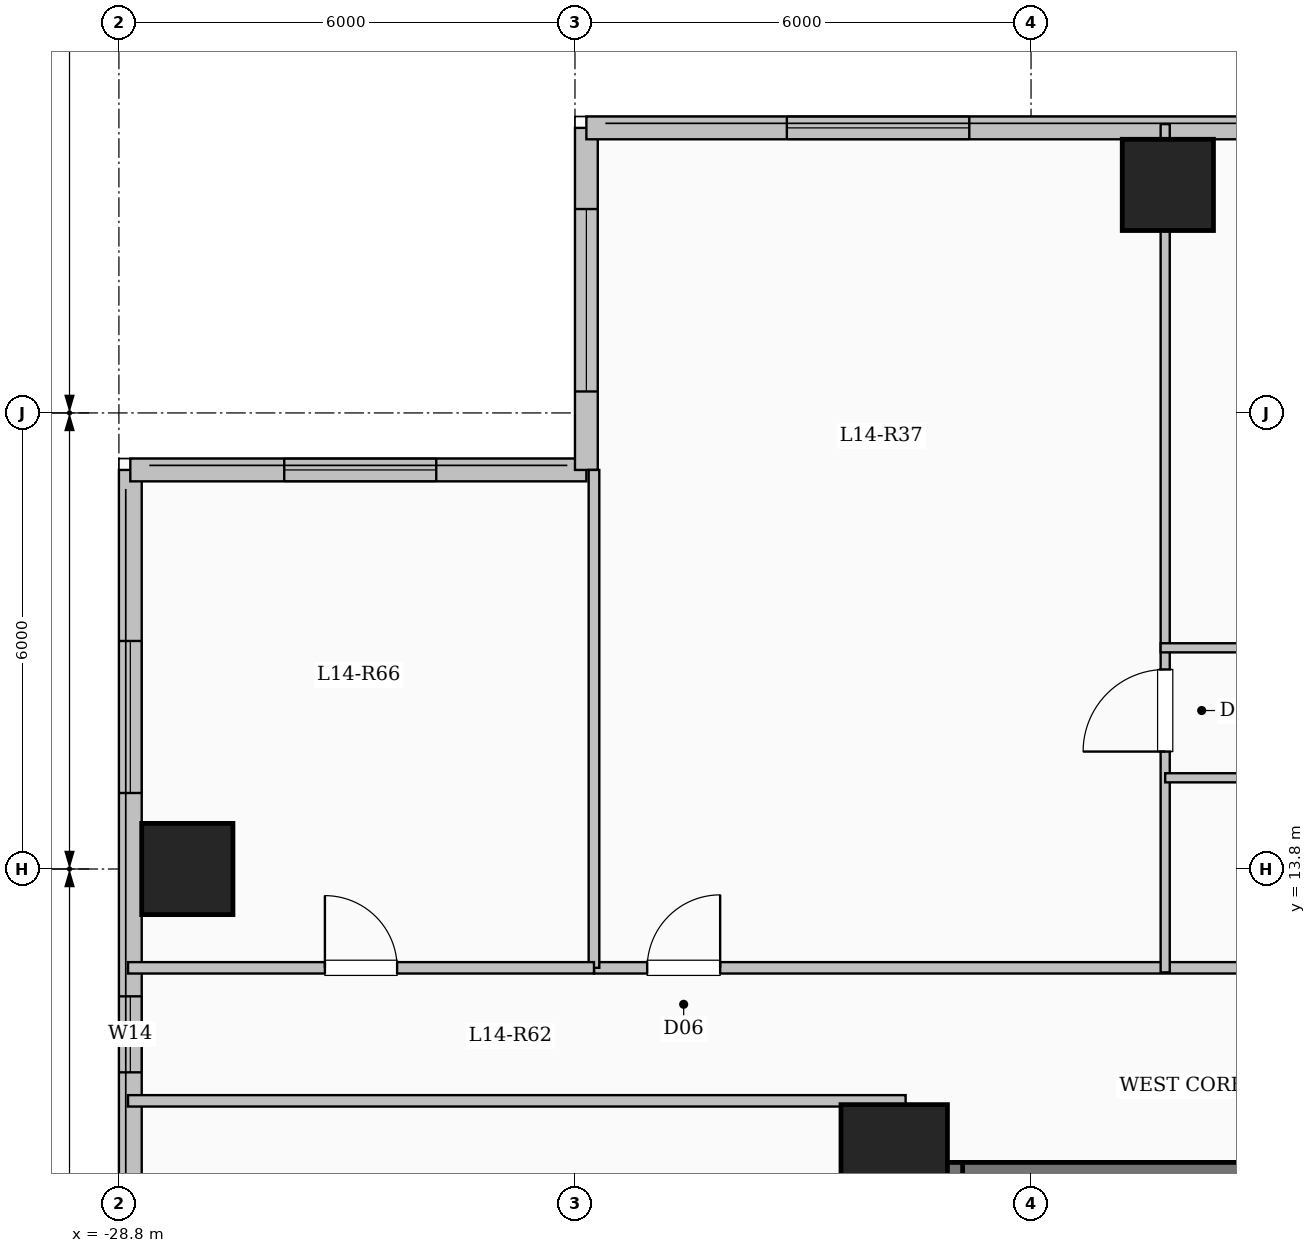
"""IFC4 building model, lengths in metres.
Left out: names, types, materials, properties, quantities, classifications, styles, units other than length and angle.
Written with IfcOpenShell. Run it as: python <this file> out.ifc"""

import sys

from ifc_helpers import new_model, si_unit, direction, frame, frame_2d, origin, origin_2d, place, context, subcontext, project, spatial, rectangle, extrude, element, fill, save


model = new_model("IFC4")
c1 = context("Model", 3, precision=1e-05, world=origin(), true_north=direction((0.0, 1.0)))
c2 = subcontext(c1, "Body", "Model", "MODEL_VIEW")
j1 = project(units=[si_unit("LENGTHUNIT", "METRE"), si_unit("PLANEANGLEUNIT", "RADIAN")], contexts=[c1])
p1 = place(None, origin())
s1 = spatial("IfcSite", under=j1, at=p1, CompositionType="ELEMENT")
p2 = place(p1, origin())
s2 = spatial("IfcBuilding", under=s1, at=p2, CompositionType="ELEMENT")
p3 = place(p2, frame((0.0, 0.0, 54.15)))
s3 = spatial("IfcBuildingStorey", under=s2, at=p3, CompositionType="ELEMENT", Elevation=54.15)
p4 = place(p3, frame((-18.6, 10.0, 0.0), z_axis=(0.0, 0.0, 1.0), x_axis=(1.0, 0.0, 0.0)))
e1 = element("IfcColumn", 1, at=p4, inside=s3, PredefinedType="COLUMN", context=c2, shape_type="SweptSolid", body=[
    extrude(rectangle(XDim=1.4, YDim=1.4, at=origin_2d()), origin(), (0.0, 0.0, 1.0), 3.35),
])
for number, where, z_axis, x_axis in (
    (2, (-15.0, 22.8, 0.0), (0.0, 0.0, 1.0), (1.0, 0.0, 0.0)),
    (3, (-27.9, 13.8, 0.0), (0.0, 0.0, 1.0), (1.0, 0.0, 0.0)),
):
    element("IfcColumn", number, at=place(p3, frame(where, z_axis=z_axis, x_axis=x_axis)), inside=s3, PredefinedType="COLUMN", context=c2, shape_type="SweptSolid", body=[
        extrude(rectangle(XDim=1.2, YDim=1.2, at=origin_2d()), origin(), (0.0, 0.0, 1.0), 3.35),
    ])
p5 = place(p3, frame((-28.65, -19.05, 0.0), z_axis=(0.0, 0.0, 1.0), x_axis=(0.0, 1.0, 0.0)))
e4 = element("IfcWall", 4, at=p5, inside=s3, PredefinedType="SOLIDWALL", context=c2, shape_type="SweptSolid", body=[
    extrude(rectangle(XDim=38.1, YDim=0.3, at=frame_2d((19.05, 0.0))), origin(), (0.0, 0.0, 1.0), 3.1),
])
p6 = place(p5, frame((3.15, 0.0, 0.9)))
e5 = element("IfcOpeningElement", 5, at=p6, cuts=e4, PredefinedType="OPENING", context=c2, shape_type="SweptSolid", body=[
    extrude(rectangle(XDim=2.4, YDim=1.8, at=frame_2d((1.2, 0.9))), frame((0.0, 0.16, 0.0), z_axis=(0.0, -1.0, 0.0), x_axis=(1.0, 0.0, 0.0)), (0.0, 0.0, 1.0), 0.32),
])
p7 = place(p5, frame((9.542, 0.0, 0.9)))
e6 = element("IfcOpeningElement", 6, at=p7, cuts=e4, PredefinedType="OPENING", context=c2, shape_type="SweptSolid", body=[
    extrude(rectangle(XDim=1.5, YDim=1.65, at=frame_2d((0.75, 0.825))), frame((0.0, 0.16, 0.0), z_axis=(0.0, -1.0, 0.0), x_axis=(1.0, 0.0, 0.0)), (0.0, 0.0, 1.0), 0.32),
])
p8 = place(p5, frame((19.8, 0.0, 0.9)))
e7 = element("IfcOpeningElement", 7, at=p8, cuts=e4, PredefinedType="OPENING", context=c2, shape_type="SweptSolid", body=[
    extrude(rectangle(XDim=2.0, YDim=1.7, at=frame_2d((1.0, 0.85))), frame((0.0, 0.16, 0.0), z_axis=(0.0, -1.0, 0.0), x_axis=(1.0, 0.0, 0.0)), (0.0, 0.0, 1.0), 0.32),
])
p9 = place(p5, frame((30.175, 0.0, 0.95)))
e8 = element("IfcOpeningElement", 8, at=p9, cuts=e4, PredefinedType="OPENING", context=c2, shape_type="SweptSolid", body=[
    extrude(rectangle(XDim=1.0, YDim=1.5, at=frame_2d((0.5, 0.75))), frame((0.0, 0.16, 0.0), z_axis=(0.0, -1.0, 0.0), x_axis=(1.0, 0.0, 0.0)), (0.0, 0.0, 1.0), 0.32),
])
p10 = place(p5, frame((33.85, 0.0, 0.9)))
e9 = element("IfcOpeningElement", 9, at=p10, cuts=e4, PredefinedType="OPENING", context=c2, shape_type="SweptSolid", body=[
    extrude(rectangle(XDim=2.0, YDim=1.7, at=frame_2d((1.0, 0.85))), frame((0.0, 0.16, 0.0), z_axis=(0.0, -1.0, 0.0), x_axis=(1.0, 0.0, 0.0)), (0.0, 0.0, 1.0), 0.32),
])
p11 = place(p3, frame((-28.65, 19.05, 0.0), z_axis=(0.0, 0.0, 1.0), x_axis=(1.0, 0.0, 0.0)))
e10 = element("IfcWall", 10, at=p11, inside=s3, PredefinedType="SOLIDWALL", context=c2, shape_type="SweptSolid", body=[
    extrude(rectangle(XDim=6.0, YDim=0.3, at=frame_2d((3.0, 0.0))), origin(), (0.0, 0.0, 1.0), 3.1),
])
p12 = place(p11, frame((2.025, 0.0, 0.9)))
e11 = element("IfcOpeningElement", 11, at=p12, cuts=e10, PredefinedType="OPENING", context=c2, shape_type="SweptSolid", body=[
    extrude(rectangle(XDim=2.0, YDim=1.7, at=frame_2d((1.0, 0.85))), frame((0.0, 0.16, 0.0), z_axis=(0.0, -1.0, 0.0), x_axis=(1.0, 0.0, 0.0)), (0.0, 0.0, 1.0), 0.32),
])
p13 = place(p3, frame((-22.65, 19.05, 0.0), z_axis=(0.0, 0.0, 1.0), x_axis=(0.0, 1.0, 0.0)))
e12 = element("IfcWall", 12, at=p13, inside=s3, PredefinedType="SOLIDWALL", context=c2, shape_type="SweptSolid", body=[
    extrude(rectangle(XDim=4.5, YDim=0.3, at=frame_2d((2.25, 0.0))), origin(), (0.0, 0.0, 1.0), 3.1),
])
p14 = place(p13, frame((1.032, 0.0, 0.9)))
e13 = element("IfcOpeningElement", 13, at=p14, cuts=e12, PredefinedType="OPENING", context=c2, shape_type="SweptSolid", body=[
    extrude(rectangle(XDim=2.4, YDim=1.8, at=frame_2d((1.2, 0.9))), frame((0.0, 0.16, 0.0), z_axis=(0.0, -1.0, 0.0), x_axis=(1.0, 0.0, 0.0)), (0.0, 0.0, 1.0), 0.32),
])
p15 = place(p3, frame((-22.65, 23.55, 0.0), z_axis=(0.0, 0.0, 1.0), x_axis=(1.0, 0.0, 0.0)))
e14 = element("IfcWall", 14, at=p15, inside=s3, PredefinedType="SOLIDWALL", context=c2, shape_type="SweptSolid", body=[
    extrude(rectangle(XDim=15.3, YDim=0.3, at=frame_2d((7.65, 0.0))), origin(), (0.0, 0.0, 1.0), 3.1),
])
p16 = place(p15, frame((2.637, 0.0, 0.9)))
e15 = element("IfcOpeningElement", 15, at=p16, cuts=e14, PredefinedType="OPENING", context=c2, shape_type="SweptSolid", body=[
    extrude(rectangle(XDim=2.4, YDim=1.8, at=frame_2d((1.2, 0.9))), frame((0.0, 0.16, 0.0), z_axis=(0.0, -1.0, 0.0), x_axis=(1.0, 0.0, 0.0)), (0.0, 0.0, 1.0), 0.32),
])
p17 = place(p15, frame((8.656, 0.0, 0.9)))
e16 = element("IfcOpeningElement", 16, at=p17, cuts=e14, PredefinedType="OPENING", context=c2, shape_type="SweptSolid", body=[
    extrude(rectangle(XDim=1.8, YDim=1.65, at=frame_2d((0.9, 0.825))), frame((0.0, 0.16, 0.0), z_axis=(0.0, -1.0, 0.0), x_axis=(1.0, 0.0, 0.0)), (0.0, 0.0, 1.0), 0.32),
])
p18 = place(p15, frame((12.544, 0.0, 0.9)))
e17 = element("IfcOpeningElement", 17, at=p18, cuts=e14, PredefinedType="OPENING", context=c2, shape_type="SweptSolid", body=[
    extrude(rectangle(XDim=1.8, YDim=1.65, at=frame_2d((0.9, 0.825))), frame((0.0, 0.16, 0.0), z_axis=(0.0, -1.0, 0.0), x_axis=(1.0, 0.0, 0.0)), (0.0, 0.0, 1.0), 0.32),
])
p19 = place(p3, frame((-18.0, 9.79, 0.0), z_axis=(0.0, 0.0, 1.0), x_axis=(1.0, 0.0, 0.0)))
e18 = element("IfcWall", 18, at=p19, inside=s3, PredefinedType="SHEAR", context=c2, shape_type="SweptSolid", body=[
    extrude(rectangle(XDim=8.0, YDim=0.3, at=frame_2d((4.0, 0.0))), origin(), (0.0, 0.0, 1.0), 3.35),
])
p20 = place(p3, frame((-17.85, 6.35, 0.0), z_axis=(0.0, 0.0, 1.0), x_axis=(0.0, 1.0, 0.0)))
e19 = element("IfcWall", 19, at=p20, inside=s3, PredefinedType="SHEAR", context=c2, shape_type="SweptSolid", body=[
    extrude(rectangle(XDim=3.59, YDim=0.3, at=frame_2d((1.795, 0.0))), origin(), (0.0, 0.0, 1.0), 3.35),
])
p21 = place(p3, frame((-22.55, 12.5, 0.0), z_axis=(0.0, 0.0, 1.0), x_axis=(1.0, 0.0, 0.0)))
e20 = element("IfcWall", 20, at=p21, inside=s3, PredefinedType="PARTITIONING", context=c2, shape_type="SweptSolid", body=[
    extrude(rectangle(XDim=18.7, YDim=0.15, at=frame_2d((9.35, 0.0))), origin(), (0.0, 0.0, 1.0), 3.1),
])
p22 = place(p21, frame((0.7, 0.0, 0.0)))
e21 = element("IfcOpeningElement", 21, at=p22, cuts=e20, PredefinedType="OPENING", context=c2, shape_type="SweptSolid", body=[
    extrude(rectangle(XDim=0.96, YDim=2.15, at=frame_2d((0.48, 1.075))), frame((0.0, 0.085, 0.0), z_axis=(0.0, -1.0, 0.0), x_axis=(1.0, 0.0, 0.0)), (0.0, 0.0, 1.0), 0.17),
])
p23 = place(p3, frame((-15.035, 12.44, 0.0), z_axis=(0.0, 0.0, 1.0), x_axis=(0.0, 1.0, 0.0)))
e22 = element("IfcWall", 22, at=p23, inside=s3, PredefinedType="PARTITIONING", context=c2, shape_type="SweptSolid", body=[
    extrude(rectangle(XDim=11.16, YDim=0.12, at=frame_2d((5.58, 0.0))), origin(), (0.0, 0.0, 1.0), 2.435),
])
p24 = place(p23, frame((2.905, 0.0, 0.0)))
e23 = element("IfcOpeningElement", 23, at=p24, cuts=e22, PredefinedType="OPENING", context=c2, shape_type="SweptSolid", body=[
    extrude(rectangle(XDim=1.08, YDim=2.15, at=frame_2d((0.54, 1.075))), frame((0.0, 0.07, 0.0), z_axis=(0.0, -1.0, 0.0), x_axis=(1.0, 0.0, 0.0)), (0.0, 0.0, 1.0), 0.14),
])
p25 = place(p3, frame((-15.035, 15.0, 0.0), z_axis=(0.0, 0.0, 1.0), x_axis=(1.0, 0.0, 0.0)))
e24 = element("IfcWall", 24, at=p25, inside=s3, PredefinedType="PARTITIONING", context=c2, shape_type="SweptSolid", body=[
    extrude(rectangle(XDim=8.228, YDim=0.12, at=frame_2d((4.114, 0.0))), origin(), (0.0, 0.0, 1.0), 2.585),
])
p26 = place(p25, frame((3.674, 0.0, 0.0)))
e25 = element("IfcOpeningElement", 25, at=p26, cuts=e24, PredefinedType="OPENING", context=c2, shape_type="SweptSolid", body=[
    extrude(rectangle(XDim=0.88, YDim=2.1, at=frame_2d((0.44, 1.05))), frame((0.0, 0.07, 0.0), z_axis=(0.0, -1.0, 0.0), x_axis=(1.0, 0.0, 0.0)), (0.0, 0.0, 1.0), 0.14),
])
p27 = place(p3, frame((-15.095, 16.71, 0.0), z_axis=(0.0, 0.0, 1.0), x_axis=(1.0, 0.0, 0.0)))
e26 = element("IfcWall", 26, at=p27, inside=s3, PredefinedType="PARTITIONING", context=c2, shape_type="SweptSolid", body=[
    extrude(rectangle(XDim=15.705, YDim=0.12, at=frame_2d((7.853, 0.0))), origin(), (0.0, 0.0, 1.0), 2.585),
])
p28 = place(p27, frame((1.501, 0.0, 0.0)))
e27 = element("IfcOpeningElement", 27, at=p28, cuts=e26, PredefinedType="OPENING", context=c2, shape_type="SweptSolid", body=[
    extrude(rectangle(XDim=0.88, YDim=2.1, at=frame_2d((0.44, 1.05))), frame((0.0, 0.07, 0.0), z_axis=(0.0, -1.0, 0.0), x_axis=(1.0, 0.0, 0.0)), (0.0, 0.0, 1.0), 0.14),
])
p29 = place(p27, frame((5.382, 0.0, 0.0)))
e28 = element("IfcOpeningElement", 28, at=p29, cuts=e26, PredefinedType="OPENING", context=c2, shape_type="SweptSolid", body=[
    extrude(rectangle(XDim=0.88, YDim=2.1, at=frame_2d((0.44, 1.05))), frame((0.0, 0.07, 0.0), z_axis=(0.0, -1.0, 0.0), x_axis=(1.0, 0.0, 0.0)), (0.0, 0.0, 1.0), 0.14),
])
p30 = place(p27, frame((9.263, 0.0, 0.0)))
e29 = element("IfcOpeningElement", 29, at=p30, cuts=e26, PredefinedType="OPENING", context=c2, shape_type="SweptSolid", body=[
    extrude(rectangle(XDim=0.88, YDim=2.1, at=frame_2d((0.44, 1.05))), frame((0.0, 0.07, 0.0), z_axis=(0.0, -1.0, 0.0), x_axis=(1.0, 0.0, 0.0)), (0.0, 0.0, 1.0), 0.14),
])
p31 = place(p27, frame((13.144, 0.0, 0.0)))
e30 = element("IfcOpeningElement", 30, at=p31, cuts=e26, PredefinedType="OPENING", context=c2, shape_type="SweptSolid", body=[
    extrude(rectangle(XDim=0.88, YDim=2.1, at=frame_2d((0.44, 1.05))), frame((0.0, 0.07, 0.0), z_axis=(0.0, -1.0, 0.0), x_axis=(1.0, 0.0, 0.0)), (0.0, 0.0, 1.0), 0.14),
])
p32 = place(p3, frame((-28.68, 10.75, 0.0), z_axis=(0.0, 0.0, 1.0), x_axis=(1.0, 0.0, 0.0)))
e31 = element("IfcWall", 31, at=p32, inside=s3, PredefinedType="PARTITIONING", context=c2, shape_type="SweptSolid", body=[
    extrude(rectangle(XDim=10.23, YDim=0.15, at=frame_2d((5.115, 0.0))), origin(), (0.0, 0.0, 1.0), 3.1),
])
p33 = place(p3, frame((-22.55, 12.5, 0.0), z_axis=(0.0, 0.0, 1.0), x_axis=(0.0, 1.0, 0.0)))
e32 = element("IfcWall", 32, at=p33, inside=s3, PredefinedType="PARTITIONING", context=c2, shape_type="SweptSolid", body=[
    extrude(rectangle(XDim=6.55, YDim=0.14, at=frame_2d((3.275, 0.0))), origin(), (0.0, 0.0, 1.0), 3.1),
])
p34 = place(p3, frame((-28.68, 12.5, 0.0), z_axis=(0.0, 0.0, 1.0), x_axis=(1.0, 0.0, 0.0)))
e33 = element("IfcWall", 33, at=p34, inside=s3, PredefinedType="PARTITIONING", context=c2, shape_type="SweptSolid", body=[
    extrude(rectangle(XDim=6.13, YDim=0.15, at=frame_2d((3.065, 0.0))), origin(), (0.0, 0.0, 1.0), 3.1),
])
p35 = place(p34, frame((2.59, 0.0, 0.0)))
e34 = element("IfcOpeningElement", 34, at=p35, cuts=e33, PredefinedType="OPENING", context=c2, shape_type="SweptSolid", body=[
    extrude(rectangle(XDim=0.95, YDim=2.15, at=frame_2d((0.475, 1.075))), frame((0.0, 0.085, 0.0), z_axis=(0.0, -1.0, 0.0), x_axis=(1.0, 0.0, 0.0)), (0.0, 0.0, 1.0), 0.17),
])
p36 = place(p9, origin())
e35 = element("IfcWindow", 35, at=p36, inside=s3, PartitioningType="SINGLE_PANEL", PredefinedType="WINDOW", context=c2, shape_type="SweptSolid", body=[
    extrude(rectangle(XDim=1.0, YDim=1.5, at=frame_2d((0.5, 0.75))), frame((0.0, 0.03, 0.0), z_axis=(0.0, -1.0, 0.0), x_axis=(1.0, 0.0, 0.0)), (0.0, 0.0, 1.0), 0.06),
])
fill(e8, e35)
p37 = place(p10, origin())
e36 = element("IfcWindow", 36, at=p37, inside=s3, PartitioningType="SINGLE_PANEL", PredefinedType="WINDOW", context=c2, shape_type="SweptSolid", body=[
    extrude(rectangle(XDim=2.0, YDim=1.7, at=frame_2d((1.0, 0.85))), frame((0.0, 0.03, 0.0), z_axis=(0.0, -1.0, 0.0), x_axis=(1.0, 0.0, 0.0)), (0.0, 0.0, 1.0), 0.06),
])
fill(e9, e36)
p38 = place(p12, origin())
e37 = element("IfcWindow", 37, at=p38, inside=s3, PartitioningType="SINGLE_PANEL", PredefinedType="WINDOW", context=c2, shape_type="SweptSolid", body=[
    extrude(rectangle(XDim=2.0, YDim=1.7, at=frame_2d((1.0, 0.85))), frame((0.0, 0.03, 0.0), z_axis=(0.0, -1.0, 0.0), x_axis=(1.0, 0.0, 0.0)), (0.0, 0.0, 1.0), 0.06),
])
fill(e11, e37)
p39 = place(p14, origin())
e38 = element("IfcWindow", 38, at=p39, inside=s3, PartitioningType="SINGLE_PANEL", PredefinedType="WINDOW", context=c2, shape_type="SweptSolid", body=[
    extrude(rectangle(XDim=2.4, YDim=1.8, at=frame_2d((1.2, 0.9))), frame((0.0, 0.03, 0.0), z_axis=(0.0, -1.0, 0.0), x_axis=(1.0, 0.0, 0.0)), (0.0, 0.0, 1.0), 0.06),
])
fill(e13, e38)
p40 = place(p16, origin())
e39 = element("IfcWindow", 39, at=p40, inside=s3, PartitioningType="SINGLE_PANEL", PredefinedType="WINDOW", context=c2, shape_type="SweptSolid", body=[
    extrude(rectangle(XDim=2.4, YDim=1.8, at=frame_2d((1.2, 0.9))), frame((0.0, 0.03, 0.0), z_axis=(0.0, -1.0, 0.0), x_axis=(1.0, 0.0, 0.0)), (0.0, 0.0, 1.0), 0.06),
])
fill(e15, e39)
p41 = place(p22, origin())
e40 = element("IfcDoor", 40, at=p41, inside=s3, OperationType="SINGLE_SWING_RIGHT", PredefinedType="DOOR", context=c2, shape_type="SweptSolid", body=[
    extrude(rectangle(XDim=0.96, YDim=2.15, at=frame_2d((0.48, 1.075))), frame((0.0, 0.025, 0.0), z_axis=(0.0, -1.0, 0.0), x_axis=(1.0, 0.0, 0.0)), (0.0, 0.0, 1.0), 0.05),
])
fill(e21, e40)
p42 = place(p24, origin())
e41 = element("IfcDoor", 41, at=p42, inside=s3, OperationType="SINGLE_SWING_LEFT", PredefinedType="DOOR", context=c2, shape_type="SweptSolid", body=[
    extrude(rectangle(XDim=1.08, YDim=2.15, at=frame_2d((0.54, 1.075))), frame((0.0, 0.025, 0.0), z_axis=(0.0, -1.0, 0.0), x_axis=(1.0, 0.0, 0.0)), (0.0, 0.0, 1.0), 0.05),
])
fill(e23, e41)
p43 = place(p35, origin())
e42 = element("IfcDoor", 42, at=p43, inside=s3, OperationType="SINGLE_SWING_LEFT", PredefinedType="DOOR", context=c2, shape_type="SweptSolid", body=[
    extrude(rectangle(XDim=0.95, YDim=2.15, at=frame_2d((0.475, 1.075))), frame((0.0, 0.025, 0.0), z_axis=(0.0, -1.0, 0.0), x_axis=(1.0, 0.0, 0.0)), (0.0, 0.0, 1.0), 0.05),
])
fill(e34, e42)
save(model, sys.argv[1])
